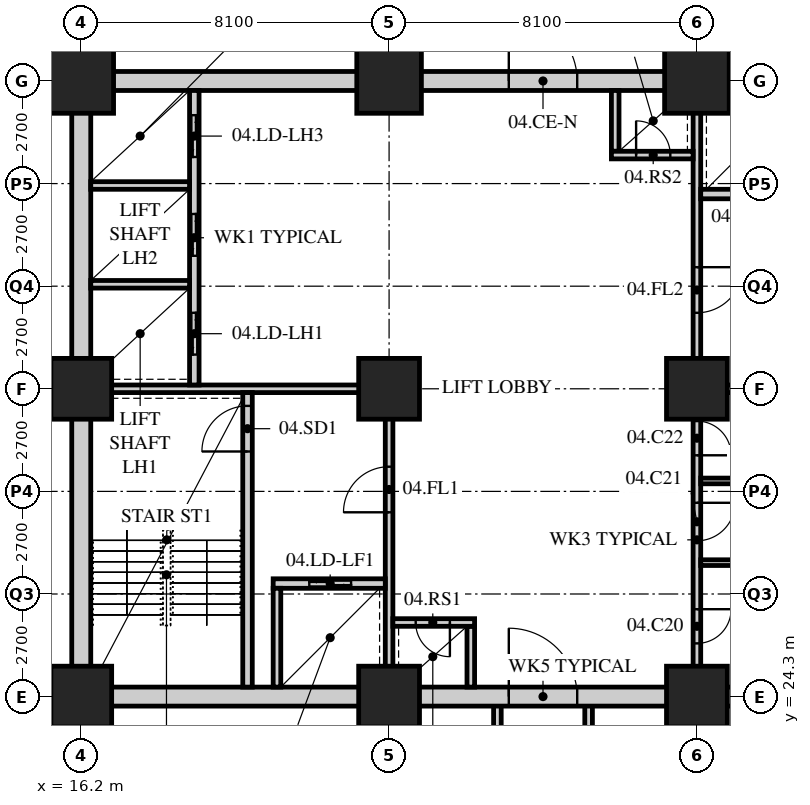
"""IFC4 building model, lengths in metres.
Left out: names, types, materials, properties, quantities, classifications, styles, units other than length and angle.
Written with IfcOpenShell. Run it as: python <this file> out.ifc"""

import sys

from ifc_helpers import new_model, si_unit, direction, frame, frame_2d, origin, origin_2d, place, context, subcontext, project, spatial, rectangle, hollow_rectangle, extrude, element, fill, save


model = new_model("IFC4")
c1 = context("Model", 3, precision=1e-05, world=origin(), true_north=direction((0.0, 1.0)))
c2 = subcontext(c1, "Body", "Model", "MODEL_VIEW")
j1 = project(units=[si_unit("LENGTHUNIT", "METRE"), si_unit("PLANEANGLEUNIT", "RADIAN")], contexts=[c1])
p1 = place(None, origin())
s1 = spatial("IfcSite", under=j1, at=p1, CompositionType="ELEMENT")
p2 = place(p1, origin())
s2 = spatial("IfcBuilding", under=s1, at=p2, CompositionType="ELEMENT")
p3 = place(p2, frame((0.0, 0.0, 22.2)))
s3 = spatial("IfcBuildingStorey", under=s2, at=p3, CompositionType="ELEMENT", Elevation=22.2)
for number, where, z_axis, x_axis in (
    (1, (16.2, 24.3, 0.0), (0.0, 0.0, 1.0), (1.0, 0.0, 0.0)),
    (2, (16.2, 32.4, 0.0), (0.0, 0.0, 1.0), (1.0, 0.0, 0.0)),
):
    element("IfcColumn", number, at=place(p3, frame(where, z_axis=z_axis, x_axis=x_axis)), inside=s3, PredefinedType="COLUMN", context=c2, shape_type="SweptSolid", body=[
        extrude(hollow_rectangle(XDim=1.6, YDim=1.6, WallThickness=0.15, at=origin_2d()), origin(), (0.0, 0.0, 1.0), 5.4),
    ])
p4 = place(p3, frame((16.2, 40.5, 0.0), z_axis=(0.0, 0.0, 1.0), x_axis=(1.0, 0.0, 0.0)))
e3 = element("IfcColumn", 3, at=p4, inside=s3, PredefinedType="COLUMN", context=c2, shape_type="SweptSolid", body=[
    extrude(hollow_rectangle(XDim=1.7, YDim=1.7, WallThickness=0.16, at=origin_2d()), origin(), (0.0, 0.0, 1.0), 5.4),
])
for number, where, z_axis, x_axis in (
    (4, (24.3, 24.3, 0.0), (0.0, 0.0, 1.0), (1.0, 0.0, 0.0)),
    (5, (24.3, 32.4, 0.0), (0.0, 0.0, 1.0), (1.0, 0.0, 0.0)),
):
    element("IfcColumn", number, at=place(p3, frame(where, z_axis=z_axis, x_axis=x_axis)), inside=s3, PredefinedType="COLUMN", context=c2, shape_type="SweptSolid", body=[
        extrude(hollow_rectangle(XDim=1.6, YDim=1.6, WallThickness=0.15, at=origin_2d()), origin(), (0.0, 0.0, 1.0), 5.4),
    ])
p5 = place(p3, frame((24.3, 40.5, 0.0), z_axis=(0.0, 0.0, 1.0), x_axis=(1.0, 0.0, 0.0)))
e6 = element("IfcColumn", 6, at=p5, inside=s3, PredefinedType="COLUMN", context=c2, shape_type="SweptSolid", body=[
    extrude(hollow_rectangle(XDim=1.7, YDim=1.7, WallThickness=0.16, at=origin_2d()), origin(), (0.0, 0.0, 1.0), 5.4),
])
for number, where, z_axis, x_axis in (
    (7, (32.4, 24.3, 0.0), (0.0, 0.0, 1.0), (1.0, 0.0, 0.0)),
    (8, (32.4, 32.4, 0.0), (0.0, 0.0, 1.0), (1.0, 0.0, 0.0)),
):
    element("IfcColumn", number, at=place(p3, frame(where, z_axis=z_axis, x_axis=x_axis)), inside=s3, PredefinedType="COLUMN", context=c2, shape_type="SweptSolid", body=[
        extrude(hollow_rectangle(XDim=1.6, YDim=1.6, WallThickness=0.15, at=origin_2d()), origin(), (0.0, 0.0, 1.0), 5.4),
    ])
p6 = place(p3, frame((32.4, 40.5, 0.0), z_axis=(0.0, 0.0, 1.0), x_axis=(1.0, 0.0, 0.0)))
e9 = element("IfcColumn", 9, at=p6, inside=s3, PredefinedType="COLUMN", context=c2, shape_type="SweptSolid", body=[
    extrude(hollow_rectangle(XDim=1.7, YDim=1.7, WallThickness=0.16, at=origin_2d()), origin(), (0.0, 0.0, 1.0), 5.4),
])
p7 = place(p3, frame((16.068, 40.65, 0.0), z_axis=(0.0, 0.0, 1.0), x_axis=(-1.0, 0.0, 0.0)))
e10 = element("IfcWall", 10, at=p7, inside=s3, PredefinedType="PARTITIONING", context=c2, shape_type="SweptSolid", body=[
    extrude(rectangle(XDim=6.168, YDim=0.15, at=frame_2d((3.084, 0.0))), origin(), (0.0, 0.0, 1.0), 4.428),
])
p8 = place(p3, frame((9.9, 32.4, 0.0), z_axis=(0.0, 0.0, 1.0), x_axis=(1.0, 0.0, 0.0)))
e11 = element("IfcWall", 11, at=p8, inside=s3, PredefinedType="SOLIDWALL", context=c2, shape_type="SweptSolid", body=[
    extrude(rectangle(XDim=6.3, YDim=0.2, at=frame_2d((3.15, 0.0))), origin(), (0.0, 0.0, 1.0), 4.428),
])
for number, where, z_axis, x_axis in (
    (12, (27.15, 9.9, 0.0), (0.0, 0.0, 1.0), (0.0, 1.0, 0.0)),
    (13, (29.55, 9.9, 0.0), (0.0, 0.0, 1.0), (0.0, 1.0, 0.0)),
):
    element("IfcWall", number, at=place(p3, frame(where, z_axis=z_axis, x_axis=x_axis)), inside=s3, PredefinedType="SOLIDWALL", context=c2, shape_type="SweptSolid", body=[
        extrude(rectangle(XDim=14.4, YDim=0.2, at=frame_2d((7.2, 0.0))), origin(), (0.0, 0.0, 1.0), 5.19),
    ])
p9 = place(p3, frame((9.9, 24.35, 0.0), z_axis=(0.0, 0.0, 1.0), x_axis=(1.0, 0.0, 0.0)))
e14 = element("IfcWall", 14, at=p9, inside=s3, PredefinedType="SOLIDWALL", context=c2, shape_type="SweptSolid", body=[
    extrude(rectangle(XDim=6.3, YDim=0.2, at=frame_2d((3.15, 0.0))), origin(), (0.0, 0.0, 1.0), 4.428),
])
p10 = place(p3, frame((15.95, 24.3, 0.0), z_axis=(0.0, 0.0, 1.0), x_axis=(1.0, 0.0, 0.0)))
e15 = element("IfcWall", 15, at=p10, inside=s3, PredefinedType="SOLIDWALL", context=c2, shape_type="SweptSolid", body=[
    extrude(rectangle(XDim=24.8, YDim=0.5, at=frame_2d((12.4, 0.0))), origin(), (0.0, 0.0, 1.0), 4.428),
])
p11 = place(p10, frame((11.5, 0.0, 0.0)))
e16 = element("IfcOpeningElement", 16, at=p11, cuts=e15, PredefinedType="OPENING", context=c2, shape_type="SweptSolid", body=[
    extrude(rectangle(XDim=1.8, YDim=2.4, at=frame_2d((0.9, 1.2))), frame((0.0, 0.26, 0.0), z_axis=(0.0, -1.0, 0.0), x_axis=(1.0, 0.0, 0.0)), (0.0, 0.0, 1.0), 0.52),
])
p12 = place(p3, frame((15.95, 40.5, 0.0), z_axis=(0.0, 0.0, 1.0), x_axis=(1.0, 0.0, 0.0)))
e17 = element("IfcWall", 17, at=p12, inside=s3, PredefinedType="SOLIDWALL", context=c2, shape_type="SweptSolid", body=[
    extrude(rectangle(XDim=24.8, YDim=0.5, at=frame_2d((12.4, 0.0))), origin(), (0.0, 0.0, 1.0), 4.428),
])
p13 = place(p12, frame((11.5, 0.0, 0.0)))
e18 = element("IfcOpeningElement", 18, at=p13, cuts=e17, PredefinedType="OPENING", context=c2, shape_type="SweptSolid", body=[
    extrude(rectangle(XDim=1.8, YDim=2.4, at=frame_2d((0.9, 1.2))), frame((0.0, 0.26, 0.0), z_axis=(0.0, -1.0, 0.0), x_axis=(1.0, 0.0, 0.0)), (0.0, 0.0, 1.0), 0.52),
])
p14 = place(p3, frame((16.2, 24.55, 0.0), z_axis=(0.0, 0.0, 1.0), x_axis=(0.0, 1.0, 0.0)))
e19 = element("IfcWall", 19, at=p14, inside=s3, PredefinedType="SOLIDWALL", context=c2, shape_type="SweptSolid", body=[
    extrude(rectangle(XDim=15.7, YDim=0.5, at=frame_2d((7.85, 0.0))), origin(), (0.0, 0.0, 1.0), 4.428),
])
p15 = place(p3, frame((16.45, 32.4, 0.0), z_axis=(0.0, 0.0, 1.0), x_axis=(1.0, 0.0, 0.0)))
e20 = element("IfcWall", 20, at=p15, inside=s3, PredefinedType="SOLIDWALL", context=c2, shape_type="SweptSolid", body=[
    extrude(rectangle(XDim=7.95, YDim=0.2, at=frame_2d((3.975, 0.0))), origin(), (0.0, 0.0, 1.0), 4.428),
])
p16 = place(p3, frame((24.3, 24.55, 0.0), z_axis=(0.0, 0.0, 1.0), x_axis=(0.0, 1.0, 0.0)))
e21 = element("IfcWall", 21, at=p16, inside=s3, PredefinedType="SOLIDWALL", context=c2, shape_type="SweptSolid", body=[
    extrude(rectangle(XDim=7.75, YDim=0.2, at=frame_2d((3.875, 0.0))), origin(), (0.0, 0.0, 1.0), 4.428),
])
p17 = place(p16, frame((4.6, 0.0, 0.0)))
e22 = element("IfcOpeningElement", 22, at=p17, cuts=e21, PredefinedType="OPENING", context=c2, shape_type="SweptSolid", body=[
    extrude(rectangle(XDim=1.2, YDim=2.1, at=frame_2d((0.6, 1.05))), frame((0.0, 0.11, 0.0), z_axis=(0.0, -1.0, 0.0), x_axis=(1.0, 0.0, 0.0)), (0.0, 0.0, 1.0), 0.22),
])
p18 = place(p3, frame((20.575, 24.55, 0.0), z_axis=(0.0, 0.0, 1.0), x_axis=(0.0, 1.0, 0.0)))
e23 = element("IfcWall", 23, at=p18, inside=s3, PredefinedType="SOLIDWALL", context=c2, shape_type="SweptSolid", body=[
    extrude(rectangle(XDim=7.75, YDim=0.25, at=frame_2d((3.875, 0.0))), origin(), (0.0, 0.0, 1.0), 5.19),
])
p19 = place(p18, frame((6.2, 0.0, 0.0)))
e24 = element("IfcOpeningElement", 24, at=p19, cuts=e23, PredefinedType="OPENING", context=c2, shape_type="SweptSolid", body=[
    extrude(rectangle(XDim=1.2, YDim=2.1, at=frame_2d((0.6, 1.05))), frame((0.0, 0.135, 0.0), z_axis=(0.0, -1.0, 0.0), x_axis=(1.0, 0.0, 0.0)), (0.0, 0.0, 1.0), 0.27),
])
p20 = place(p3, frame((21.25, 27.275, 0.0), z_axis=(0.0, 0.0, 1.0), x_axis=(1.0, 0.0, 0.0)))
e25 = element("IfcWall", 25, at=p20, inside=s3, PredefinedType="SOLIDWALL", context=c2, shape_type="SweptSolid", body=[
    extrude(rectangle(XDim=2.95, YDim=0.25, at=frame_2d((1.475, 0.0))), origin(), (0.0, 0.0, 1.0), 5.19),
])
p21 = place(p20, frame((0.95, 0.0, 0.0)))
e26 = element("IfcOpeningElement", 26, at=p21, cuts=e25, PredefinedType="OPENING", context=c2, shape_type="SweptSolid", body=[
    extrude(rectangle(XDim=1.1, YDim=2.4, at=frame_2d((0.55, 1.2))), frame((0.0, 0.135, 0.0), z_axis=(0.0, -1.0, 0.0), x_axis=(1.0, 0.0, 0.0)), (0.0, 0.0, 1.0), 0.27),
])
p22 = place(p3, frame((21.35, 24.55, 0.0), z_axis=(0.0, 0.0, 1.0), x_axis=(0.0, 1.0, 0.0)))
e27 = element("IfcWall", 27, at=p22, inside=s3, PredefinedType="SOLIDWALL", context=c2, shape_type="SweptSolid", body=[
    extrude(rectangle(XDim=2.6, YDim=0.2, at=frame_2d((1.3, 0.0))), origin(), (0.0, 0.0, 1.0), 5.19),
])
p23 = place(p3, frame((19.175, 32.5, 0.0), z_axis=(0.0, 0.0, 1.0), x_axis=(0.0, 1.0, 0.0)))
e28 = element("IfcWall", 28, at=p23, inside=s3, PredefinedType="SOLIDWALL", context=c2, shape_type="SweptSolid", body=[
    extrude(rectangle(XDim=7.75, YDim=0.25, at=frame_2d((3.875, 0.0))), origin(), (0.0, 0.0, 1.0), 5.19),
])
p24 = place(p23, frame((0.8, 0.0, 0.0)))
e29 = element("IfcOpeningElement", 29, at=p24, cuts=e28, PredefinedType="OPENING", context=c2, shape_type="SweptSolid", body=[
    extrude(rectangle(XDim=1.1, YDim=2.4, at=frame_2d((0.55, 1.2))), frame((0.0, 0.135, 0.0), z_axis=(0.0, -1.0, 0.0), x_axis=(1.0, 0.0, 0.0)), (0.0, 0.0, 1.0), 0.27),
])
p25 = place(p23, frame((3.4, 0.0, 0.0)))
e30 = element("IfcOpeningElement", 30, at=p25, cuts=e28, PredefinedType="OPENING", context=c2, shape_type="SweptSolid", body=[
    extrude(rectangle(XDim=1.1, YDim=2.4, at=frame_2d((0.55, 1.2))), frame((0.0, 0.135, 0.0), z_axis=(0.0, -1.0, 0.0), x_axis=(1.0, 0.0, 0.0)), (0.0, 0.0, 1.0), 0.27),
])
p26 = place(p23, frame((6.0, 0.0, 0.0)))
e31 = element("IfcOpeningElement", 31, at=p26, cuts=e28, PredefinedType="OPENING", context=c2, shape_type="SweptSolid", body=[
    extrude(rectangle(XDim=1.1, YDim=2.4, at=frame_2d((0.55, 1.2))), frame((0.0, 0.135, 0.0), z_axis=(0.0, -1.0, 0.0), x_axis=(1.0, 0.0, 0.0)), (0.0, 0.0, 1.0), 0.27),
])
for number, where, z_axis, x_axis in (
    (32, (16.45, 35.15, 0.0), (0.0, 0.0, 1.0), (1.0, 0.0, 0.0)),
    (33, (16.45, 37.75, 0.0), (0.0, 0.0, 1.0), (1.0, 0.0, 0.0)),
):
    element("IfcWall", number, at=place(p3, frame(where, z_axis=z_axis, x_axis=x_axis)), inside=s3, PredefinedType="SOLIDWALL", context=c2, shape_type="SweptSolid", body=[
        extrude(rectangle(XDim=2.6, YDim=0.2, at=frame_2d((1.3, 0.0))), origin(), (0.0, 0.0, 1.0), 5.19),
    ])
p27 = place(p3, frame((26.45, 24.55, 0.0), z_axis=(0.0, 0.0, 1.0), x_axis=(0.0, 1.0, 0.0)))
e34 = element("IfcWall", 34, at=p27, inside=s3, PredefinedType="SOLIDWALL", context=c2, shape_type="SweptSolid", body=[
    extrude(rectangle(XDim=1.6, YDim=0.2, at=frame_2d((0.8, 0.0))), origin(), (0.0, 0.0, 1.0), 5.19),
])
p28 = place(p3, frame((24.4, 26.25, 0.0), z_axis=(0.0, 0.0, 1.0), x_axis=(1.0, 0.0, 0.0)))
e35 = element("IfcWall", 35, at=p28, inside=s3, PredefinedType="SOLIDWALL", context=c2, shape_type="SweptSolid", body=[
    extrude(rectangle(XDim=2.15, YDim=0.2, at=frame_2d((1.075, 0.0))), origin(), (0.0, 0.0, 1.0), 5.19),
])
p29 = place(p28, frame((0.6, 0.0, 0.0)))
e36 = element("IfcOpeningElement", 36, at=p29, cuts=e35, PredefinedType="OPENING", context=c2, shape_type="SweptSolid", body=[
    extrude(rectangle(XDim=0.9, YDim=2.1, at=frame_2d((0.45, 1.05))), frame((0.0, 0.11, 0.0), z_axis=(0.0, -1.0, 0.0), x_axis=(1.0, 0.0, 0.0)), (0.0, 0.0, 1.0), 0.22),
])
p30 = place(p3, frame((32.3, 32.4, 0.0), z_axis=(0.0, 0.0, 1.0), x_axis=(1.0, 0.0, 0.0)))
e37 = element("IfcWall", 37, at=p30, inside=s3, PredefinedType="SOLIDWALL", context=c2, shape_type="SweptSolid", body=[
    extrude(rectangle(XDim=7.95, YDim=0.2, at=frame_2d((3.975, 0.0))), origin(), (0.0, 0.0, 1.0), 4.428),
])
p31 = place(p3, frame((32.4, 32.5, 0.0), z_axis=(0.0, 0.0, 1.0), x_axis=(0.0, 1.0, 0.0)))
e38 = element("IfcWall", 38, at=p31, inside=s3, PredefinedType="SOLIDWALL", context=c2, shape_type="SweptSolid", body=[
    extrude(rectangle(XDim=7.75, YDim=0.2, at=frame_2d((3.875, 0.0))), origin(), (0.0, 0.0, 1.0), 4.428),
])
p32 = place(p31, frame((1.9, 0.0, 0.0)))
e39 = element("IfcOpeningElement", 39, at=p32, cuts=e38, PredefinedType="OPENING", context=c2, shape_type="SweptSolid", body=[
    extrude(rectangle(XDim=1.2, YDim=2.1, at=frame_2d((0.6, 1.05))), frame((0.0, 0.11, 0.0), z_axis=(0.0, -1.0, 0.0), x_axis=(1.0, 0.0, 0.0)), (0.0, 0.0, 1.0), 0.22),
])
p33 = place(p3, frame((32.5, 37.525, 0.0), z_axis=(0.0, 0.0, 1.0), x_axis=(1.0, 0.0, 0.0)))
e40 = element("IfcWall", 40, at=p33, inside=s3, PredefinedType="SOLIDWALL", context=c2, shape_type="SweptSolid", body=[
    extrude(rectangle(XDim=2.95, YDim=0.25, at=frame_2d((1.475, 0.0))), origin(), (0.0, 0.0, 1.0), 5.19),
])
p34 = place(p33, frame((0.9, 0.0, 0.0)))
e41 = element("IfcOpeningElement", 41, at=p34, cuts=e40, PredefinedType="OPENING", context=c2, shape_type="SweptSolid", body=[
    extrude(rectangle(XDim=1.1, YDim=2.4, at=frame_2d((0.55, 1.2))), frame((0.0, 0.135, 0.0), z_axis=(0.0, -1.0, 0.0), x_axis=(1.0, 0.0, 0.0)), (0.0, 0.0, 1.0), 0.27),
])
p35 = place(p3, frame((30.25, 38.65, 0.0), z_axis=(0.0, 0.0, 1.0), x_axis=(0.0, 1.0, 0.0)))
e42 = element("IfcWall", 42, at=p35, inside=s3, PredefinedType="SOLIDWALL", context=c2, shape_type="SweptSolid", body=[
    extrude(rectangle(XDim=1.6, YDim=0.2, at=frame_2d((0.8, 0.0))), origin(), (0.0, 0.0, 1.0), 5.19),
])
p36 = place(p3, frame((30.15, 38.55, 0.0), z_axis=(0.0, 0.0, 1.0), x_axis=(1.0, 0.0, 0.0)))
e43 = element("IfcWall", 43, at=p36, inside=s3, PredefinedType="SOLIDWALL", context=c2, shape_type="SweptSolid", body=[
    extrude(rectangle(XDim=2.15, YDim=0.2, at=frame_2d((1.075, 0.0))), origin(), (0.0, 0.0, 1.0), 5.19),
])
p37 = place(p36, frame((0.65, 0.0, 0.0)))
e44 = element("IfcOpeningElement", 44, at=p37, cuts=e43, PredefinedType="OPENING", context=c2, shape_type="SweptSolid", body=[
    extrude(rectangle(XDim=0.9, YDim=2.1, at=frame_2d((0.45, 1.05))), frame((0.0, 0.11, 0.0), z_axis=(0.0, -1.0, 0.0), x_axis=(1.0, 0.0, 0.0)), (0.0, 0.0, 1.0), 0.22),
])
p38 = place(p3, frame((32.4, 24.55, 0.0), z_axis=(0.0, 0.0, 1.0), x_axis=(0.0, 1.0, 0.0)))
e45 = element("IfcWall", 45, at=p38, inside=s3, PredefinedType="PARTITIONING", context=c2, shape_type="SweptSolid", body=[
    extrude(rectangle(XDim=7.75, YDim=0.2, at=frame_2d((3.875, 0.0))), origin(), (0.0, 0.0, 1.0), 4.428),
])
p39 = place(p38, frame((1.15, 0.0, 0.0)))
e46 = element("IfcOpeningElement", 46, at=p39, cuts=e45, PredefinedType="OPENING", context=c2, shape_type="SweptSolid", body=[
    extrude(rectangle(XDim=0.9, YDim=2.1, at=frame_2d((0.45, 1.05))), frame((0.0, 0.11, 0.0), z_axis=(0.0, -1.0, 0.0), x_axis=(1.0, 0.0, 0.0)), (0.0, 0.0, 1.0), 0.22),
])
p40 = place(p38, frame((3.85, 0.0, 0.0)))
e47 = element("IfcOpeningElement", 47, at=p40, cuts=e45, PredefinedType="OPENING", context=c2, shape_type="SweptSolid", body=[
    extrude(rectangle(XDim=1.0, YDim=2.1, at=frame_2d((0.5, 1.05))), frame((0.0, 0.11, 0.0), z_axis=(0.0, -1.0, 0.0), x_axis=(1.0, 0.0, 0.0)), (0.0, 0.0, 1.0), 0.22),
])
p41 = place(p38, frame((6.1, 0.0, 0.0)))
e48 = element("IfcOpeningElement", 48, at=p41, cuts=e45, PredefinedType="OPENING", context=c2, shape_type="SweptSolid", body=[
    extrude(rectangle(XDim=0.9, YDim=2.1, at=frame_2d((0.45, 1.05))), frame((0.0, 0.11, 0.0), z_axis=(0.0, -1.0, 0.0), x_axis=(1.0, 0.0, 0.0)), (0.0, 0.0, 1.0), 0.22),
])
p42 = place(p3, frame((32.5, 27.825, 0.0), z_axis=(0.0, 0.0, 1.0), x_axis=(1.0, 0.0, 0.0)))
e49 = element("IfcWall", 49, at=p42, inside=s3, PredefinedType="PARTITIONING", context=c2, shape_type="SweptSolid", body=[
    extrude(rectangle(XDim=2.15, YDim=0.15, at=frame_2d((1.075, 0.0))), origin(), (0.0, 0.0, 1.0), 5.19),
])
p43 = place(p3, frame((32.5, 29.975, 0.0), z_axis=(0.0, 0.0, 1.0), x_axis=(1.0, 0.0, 0.0)))
e50 = element("IfcWall", 50, at=p43, inside=s3, PredefinedType="PARTITIONING", context=c2, shape_type="SweptSolid", body=[
    extrude(rectangle(XDim=4.9, YDim=0.15, at=frame_2d((2.45, 0.0))), origin(), (0.0, 0.0, 1.0), 5.19),
])
p44 = place(p39, origin())
e51 = element("IfcDoor", 51, at=p44, inside=s3, OperationType="SINGLE_SWING_LEFT", PredefinedType="DOOR", context=c2, shape_type="SweptSolid", body=[
    extrude(rectangle(XDim=0.9, YDim=2.1, at=frame_2d((0.45, 1.05))), frame((0.0, 0.025, 0.0), z_axis=(0.0, -1.0, 0.0), x_axis=(1.0, 0.0, 0.0)), (0.0, 0.0, 1.0), 0.05),
])
fill(e46, e51)
p45 = place(p40, origin())
e52 = element("IfcDoor", 52, at=p45, inside=s3, OperationType="SINGLE_SWING_LEFT", PredefinedType="DOOR", context=c2, shape_type="SweptSolid", body=[
    extrude(rectangle(XDim=1.0, YDim=2.1, at=frame_2d((0.5, 1.05))), frame((0.0, 0.025, 0.0), z_axis=(0.0, -1.0, 0.0), x_axis=(1.0, 0.0, 0.0)), (0.0, 0.0, 1.0), 0.05),
])
fill(e47, e52)
p46 = place(p41, origin())
e53 = element("IfcDoor", 53, at=p46, inside=s3, OperationType="SINGLE_SWING_RIGHT", PredefinedType="DOOR", context=c2, shape_type="SweptSolid", body=[
    extrude(rectangle(XDim=0.9, YDim=2.1, at=frame_2d((0.45, 1.05))), frame((0.0, 0.025, 0.0), z_axis=(0.0, -1.0, 0.0), x_axis=(1.0, 0.0, 0.0)), (0.0, 0.0, 1.0), 0.05),
])
fill(e48, e53)
p47 = place(p19, origin())
e54 = element("IfcDoor", 54, at=p47, inside=s3, OperationType="SINGLE_SWING_LEFT", PredefinedType="DOOR", context=c2, shape_type="SweptSolid", body=[
    extrude(rectangle(XDim=1.2, YDim=2.1, at=frame_2d((0.6, 1.05))), frame((0.0, 0.025, 0.0), z_axis=(0.0, -1.0, 0.0), x_axis=(1.0, 0.0, 0.0)), (0.0, 0.0, 1.0), 0.05),
])
fill(e24, e54)
p48 = place(p17, origin())
e55 = element("IfcDoor", 55, at=p48, inside=s3, OperationType="SINGLE_SWING_LEFT", PredefinedType="DOOR", context=c2, shape_type="SweptSolid", body=[
    extrude(rectangle(XDim=1.2, YDim=2.1, at=frame_2d((0.6, 1.05))), frame((0.0, 0.025, 0.0), z_axis=(0.0, -1.0, 0.0), x_axis=(1.0, 0.0, 0.0)), (0.0, 0.0, 1.0), 0.05),
])
fill(e22, e55)
p49 = place(p29, origin())
e56 = element("IfcDoor", 56, at=p49, inside=s3, OperationType="SINGLE_SWING_LEFT", PredefinedType="DOOR", context=c2, shape_type="SweptSolid", body=[
    extrude(rectangle(XDim=0.9, YDim=2.1, at=frame_2d((0.45, 1.05))), frame((0.0, 0.025, 0.0), z_axis=(0.0, -1.0, 0.0), x_axis=(1.0, 0.0, 0.0)), (0.0, 0.0, 1.0), 0.05),
])
fill(e36, e56)
p50 = place(p32, origin())
e57 = element("IfcDoor", 57, at=p50, inside=s3, OperationType="SINGLE_SWING_LEFT", PredefinedType="DOOR", context=c2, shape_type="SweptSolid", body=[
    extrude(rectangle(XDim=1.2, YDim=2.1, at=frame_2d((0.6, 1.05))), frame((0.0, 0.025, 0.0), z_axis=(0.0, -1.0, 0.0), x_axis=(1.0, 0.0, 0.0)), (0.0, 0.0, 1.0), 0.05),
])
fill(e39, e57)
p51 = place(p37, origin())
e58 = element("IfcDoor", 58, at=p51, inside=s3, OperationType="SINGLE_SWING_LEFT", PredefinedType="DOOR", context=c2, shape_type="SweptSolid", body=[
    extrude(rectangle(XDim=0.9, YDim=2.1, at=frame_2d((0.45, 1.05))), frame((0.0, 0.025, 0.0), z_axis=(0.0, -1.0, 0.0), x_axis=(1.0, 0.0, 0.0)), (0.0, 0.0, 1.0), 0.05),
])
fill(e44, e58)
p52 = place(p24, origin())
e59 = element("IfcDoor", 59, at=p52, inside=s3, OperationType="DOUBLE_DOOR_SLIDING", PredefinedType="DOOR", context=c2, shape_type="SweptSolid", body=[
    extrude(rectangle(XDim=1.1, YDim=2.4, at=frame_2d((0.55, 1.2))), frame((0.0, 0.025, 0.0), z_axis=(0.0, -1.0, 0.0), x_axis=(1.0, 0.0, 0.0)), (0.0, 0.0, 1.0), 0.05),
])
fill(e29, e59)
p53 = place(p25, origin())
e60 = element("IfcDoor", 60, at=p53, inside=s3, OperationType="DOUBLE_DOOR_SLIDING", PredefinedType="DOOR", context=c2, shape_type="SweptSolid", body=[
    extrude(rectangle(XDim=1.1, YDim=2.4, at=frame_2d((0.55, 1.2))), frame((0.0, 0.025, 0.0), z_axis=(0.0, -1.0, 0.0), x_axis=(1.0, 0.0, 0.0)), (0.0, 0.0, 1.0), 0.05),
])
fill(e30, e60)
p54 = place(p26, origin())
e61 = element("IfcDoor", 61, at=p54, inside=s3, OperationType="DOUBLE_DOOR_SLIDING", PredefinedType="DOOR", context=c2, shape_type="SweptSolid", body=[
    extrude(rectangle(XDim=1.1, YDim=2.4, at=frame_2d((0.55, 1.2))), frame((0.0, 0.025, 0.0), z_axis=(0.0, -1.0, 0.0), x_axis=(1.0, 0.0, 0.0)), (0.0, 0.0, 1.0), 0.05),
])
fill(e31, e61)
p55 = place(p21, origin())
e62 = element("IfcDoor", 62, at=p55, inside=s3, OperationType="DOUBLE_DOOR_SLIDING", PredefinedType="DOOR", context=c2, shape_type="SweptSolid", body=[
    extrude(rectangle(XDim=1.1, YDim=2.4, at=frame_2d((0.55, 1.2))), frame((0.0, 0.025, 0.0), z_axis=(0.0, -1.0, 0.0), x_axis=(1.0, 0.0, 0.0)), (0.0, 0.0, 1.0), 0.05),
])
fill(e26, e62)
p56 = place(p11, origin())
e63 = element("IfcDoor", 63, at=p56, inside=s3, OperationType="DOUBLE_DOOR_SINGLE_SWING", PredefinedType="DOOR", context=c2, shape_type="SweptSolid", body=[
    extrude(rectangle(XDim=1.8, YDim=2.4, at=frame_2d((0.9, 1.2))), frame((0.0, 0.025, 0.0), z_axis=(0.0, -1.0, 0.0), x_axis=(1.0, 0.0, 0.0)), (0.0, 0.0, 1.0), 0.05),
])
fill(e16, e63)
p57 = place(p13, origin())
e64 = element("IfcDoor", 64, at=p57, inside=s3, OperationType="DOUBLE_DOOR_SINGLE_SWING", PredefinedType="DOOR", context=c2, shape_type="SweptSolid", body=[
    extrude(rectangle(XDim=1.8, YDim=2.4, at=frame_2d((0.9, 1.2))), frame((0.0, 0.025, 0.0), z_axis=(0.0, -1.0, 0.0), x_axis=(1.0, 0.0, 0.0)), (0.0, 0.0, 1.0), 0.05),
])
fill(e18, e64)
save(model, sys.argv[1])
